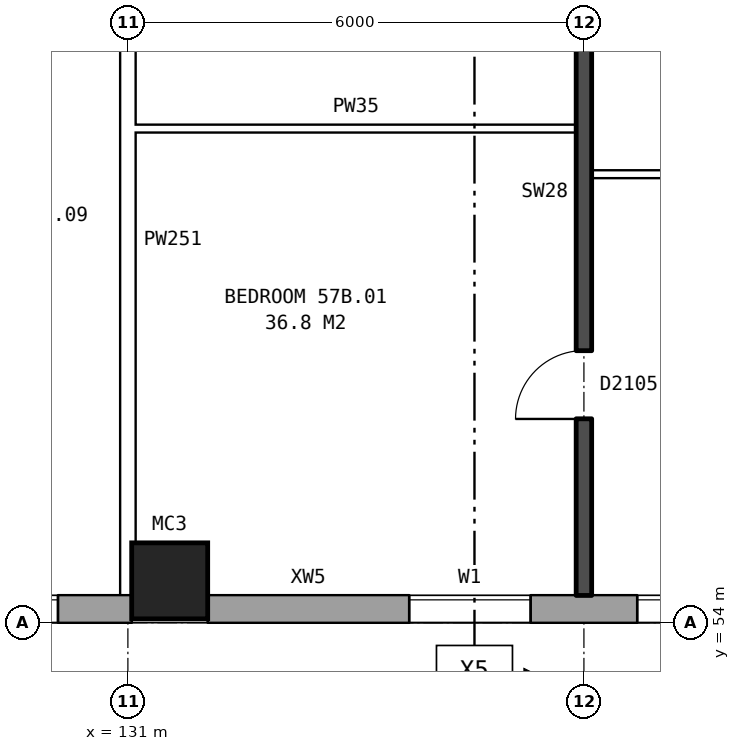
"""IFC4 building model, lengths in metres.
Left out: names, types, materials, properties, quantities, classifications, styles, units other than length and angle.
Written with IfcOpenShell. Run it as: python <this file> out.ifc"""

import sys

from ifc_helpers import new_model, si_unit, direction, frame, frame_2d, origin, origin_2d, place, context, subcontext, project, spatial, rectangle, hollow_rectangle, extrude, element, fill, save


model = new_model("IFC4")
c1 = context("Model", 3, precision=1e-05, world=origin(), true_north=direction((0.0, 1.0)))
c2 = subcontext(c1, "Body", "Model", "MODEL_VIEW")
j1 = project(units=[si_unit("LENGTHUNIT", "METRE"), si_unit("PLANEANGLEUNIT", "RADIAN")], contexts=[c1])
p1 = place(None, origin())
s1 = spatial("IfcSite", under=j1, at=p1, CompositionType="ELEMENT")
p2 = place(p1, origin())
s2 = spatial("IfcBuilding", under=s1, at=p2, CompositionType="ELEMENT")
p3 = place(p2, frame((0.0, 0.0, 202.8)))
s3 = spatial("IfcBuildingStorey", under=s2, at=p3, CompositionType="ELEMENT", Elevation=202.8)
p4 = place(p3, frame((131.55, 54.55, 0.0), z_axis=(0.0, 0.0, 1.0), x_axis=(1.0, 0.0, 0.0)))
e1 = element("IfcColumn", 1, at=p4, inside=s3, PredefinedType="COLUMN", context=c2, shape_type="SweptSolid", body=[
    extrude(hollow_rectangle(XDim=1.0, YDim=1.0, WallThickness=0.055, at=origin_2d()), origin(), (0.0, 0.0, 1.0), 3.1),
])
p5 = place(p3, frame((75.95, 54.18, 0.0), z_axis=(0.0, 0.0, 1.0), x_axis=(1.0, 0.0, 0.0)))
e2 = element("IfcWall", 2, at=p5, inside=s3, PredefinedType="STANDARD", context=c2, shape_type="SweptSolid", body=[
    extrude(rectangle(XDim=55.1, YDim=0.36, at=frame_2d((27.55, 0.0))), origin(), (0.0, 0.0, 1.0), 2.85),
])
p6 = place(p5, frame((0.969, 0.0, 0.8)))
e3 = element("IfcOpeningElement", 3, at=p6, cuts=e2, PredefinedType="OPENING", context=c2, shape_type="SweptSolid", body=[
    extrude(rectangle(XDim=1.6, YDim=1.8, at=frame_2d((0.8, 0.9))), frame((0.0, 0.19, 0.0), z_axis=(0.0, -1.0, 0.0), x_axis=(1.0, 0.0, 0.0)), (0.0, 0.0, 1.0), 0.38),
])
p7 = place(p5, frame((4.406, 0.0, 0.8)))
e4 = element("IfcOpeningElement", 4, at=p7, cuts=e2, PredefinedType="OPENING", context=c2, shape_type="SweptSolid", body=[
    extrude(rectangle(XDim=1.6, YDim=1.8, at=frame_2d((0.8, 0.9))), frame((0.0, 0.19, 0.0), z_axis=(0.0, -1.0, 0.0), x_axis=(1.0, 0.0, 0.0)), (0.0, 0.0, 1.0), 0.38),
])
p8 = place(p5, frame((7.844, 0.0, 0.8)))
e5 = element("IfcOpeningElement", 5, at=p8, cuts=e2, PredefinedType="OPENING", context=c2, shape_type="SweptSolid", body=[
    extrude(rectangle(XDim=1.6, YDim=1.8, at=frame_2d((0.8, 0.9))), frame((0.0, 0.19, 0.0), z_axis=(0.0, -1.0, 0.0), x_axis=(1.0, 0.0, 0.0)), (0.0, 0.0, 1.0), 0.38),
])
p9 = place(p5, frame((11.281, 0.0, 0.8)))
e6 = element("IfcOpeningElement", 6, at=p9, cuts=e2, PredefinedType="OPENING", context=c2, shape_type="SweptSolid", body=[
    extrude(rectangle(XDim=1.6, YDim=1.8, at=frame_2d((0.8, 0.9))), frame((0.0, 0.19, 0.0), z_axis=(0.0, -1.0, 0.0), x_axis=(1.0, 0.0, 0.0)), (0.0, 0.0, 1.0), 0.38),
])
p10 = place(p5, frame((14.719, 0.0, 0.8)))
e7 = element("IfcOpeningElement", 7, at=p10, cuts=e2, PredefinedType="OPENING", context=c2, shape_type="SweptSolid", body=[
    extrude(rectangle(XDim=1.6, YDim=1.8, at=frame_2d((0.8, 0.9))), frame((0.0, 0.19, 0.0), z_axis=(0.0, -1.0, 0.0), x_axis=(1.0, 0.0, 0.0)), (0.0, 0.0, 1.0), 0.38),
])
p11 = place(p5, frame((18.156, 0.0, 0.8)))
e8 = element("IfcOpeningElement", 8, at=p11, cuts=e2, PredefinedType="OPENING", context=c2, shape_type="SweptSolid", body=[
    extrude(rectangle(XDim=1.6, YDim=1.8, at=frame_2d((0.8, 0.9))), frame((0.0, 0.19, 0.0), z_axis=(0.0, -1.0, 0.0), x_axis=(1.0, 0.0, 0.0)), (0.0, 0.0, 1.0), 0.38),
])
p12 = place(p5, frame((21.594, 0.0, 0.8)))
e9 = element("IfcOpeningElement", 9, at=p12, cuts=e2, PredefinedType="OPENING", context=c2, shape_type="SweptSolid", body=[
    extrude(rectangle(XDim=1.6, YDim=1.8, at=frame_2d((0.8, 0.9))), frame((0.0, 0.19, 0.0), z_axis=(0.0, -1.0, 0.0), x_axis=(1.0, 0.0, 0.0)), (0.0, 0.0, 1.0), 0.38),
])
p13 = place(p5, frame((25.031, 0.0, 0.8)))
e10 = element("IfcOpeningElement", 10, at=p13, cuts=e2, PredefinedType="OPENING", context=c2, shape_type="SweptSolid", body=[
    extrude(rectangle(XDim=1.6, YDim=1.8, at=frame_2d((0.8, 0.9))), frame((0.0, 0.19, 0.0), z_axis=(0.0, -1.0, 0.0), x_axis=(1.0, 0.0, 0.0)), (0.0, 0.0, 1.0), 0.38),
])
p14 = place(p5, frame((28.469, 0.0, 0.8)))
e11 = element("IfcOpeningElement", 11, at=p14, cuts=e2, PredefinedType="OPENING", context=c2, shape_type="SweptSolid", body=[
    extrude(rectangle(XDim=1.6, YDim=1.8, at=frame_2d((0.8, 0.9))), frame((0.0, 0.19, 0.0), z_axis=(0.0, -1.0, 0.0), x_axis=(1.0, 0.0, 0.0)), (0.0, 0.0, 1.0), 0.38),
])
p15 = place(p5, frame((31.906, 0.0, 0.8)))
e12 = element("IfcOpeningElement", 12, at=p15, cuts=e2, PredefinedType="OPENING", context=c2, shape_type="SweptSolid", body=[
    extrude(rectangle(XDim=1.6, YDim=1.8, at=frame_2d((0.8, 0.9))), frame((0.0, 0.19, 0.0), z_axis=(0.0, -1.0, 0.0), x_axis=(1.0, 0.0, 0.0)), (0.0, 0.0, 1.0), 0.38),
])
p16 = place(p5, frame((35.344, 0.0, 0.8)))
e13 = element("IfcOpeningElement", 13, at=p16, cuts=e2, PredefinedType="OPENING", context=c2, shape_type="SweptSolid", body=[
    extrude(rectangle(XDim=1.6, YDim=1.8, at=frame_2d((0.8, 0.9))), frame((0.0, 0.19, 0.0), z_axis=(0.0, -1.0, 0.0), x_axis=(1.0, 0.0, 0.0)), (0.0, 0.0, 1.0), 0.38),
])
p17 = place(p5, frame((38.781, 0.0, 0.8)))
e14 = element("IfcOpeningElement", 14, at=p17, cuts=e2, PredefinedType="OPENING", context=c2, shape_type="SweptSolid", body=[
    extrude(rectangle(XDim=1.6, YDim=1.8, at=frame_2d((0.8, 0.9))), frame((0.0, 0.19, 0.0), z_axis=(0.0, -1.0, 0.0), x_axis=(1.0, 0.0, 0.0)), (0.0, 0.0, 1.0), 0.38),
])
p18 = place(p5, frame((42.219, 0.0, 0.8)))
e15 = element("IfcOpeningElement", 15, at=p18, cuts=e2, PredefinedType="OPENING", context=c2, shape_type="SweptSolid", body=[
    extrude(rectangle(XDim=1.6, YDim=1.8, at=frame_2d((0.8, 0.9))), frame((0.0, 0.19, 0.0), z_axis=(0.0, -1.0, 0.0), x_axis=(1.0, 0.0, 0.0)), (0.0, 0.0, 1.0), 0.38),
])
p19 = place(p5, frame((45.656, 0.0, 0.8)))
e16 = element("IfcOpeningElement", 16, at=p19, cuts=e2, PredefinedType="OPENING", context=c2, shape_type="SweptSolid", body=[
    extrude(rectangle(XDim=1.6, YDim=1.8, at=frame_2d((0.8, 0.9))), frame((0.0, 0.19, 0.0), z_axis=(0.0, -1.0, 0.0), x_axis=(1.0, 0.0, 0.0)), (0.0, 0.0, 1.0), 0.38),
])
p20 = place(p5, frame((49.094, 0.0, 0.8)))
e17 = element("IfcOpeningElement", 17, at=p20, cuts=e2, PredefinedType="OPENING", context=c2, shape_type="SweptSolid", body=[
    extrude(rectangle(XDim=1.6, YDim=1.8, at=frame_2d((0.8, 0.9))), frame((0.0, 0.19, 0.0), z_axis=(0.0, -1.0, 0.0), x_axis=(1.0, 0.0, 0.0)), (0.0, 0.0, 1.0), 0.38),
])
p21 = place(p5, frame((52.531, 0.0, 0.8)))
e18 = element("IfcOpeningElement", 18, at=p21, cuts=e2, PredefinedType="OPENING", context=c2, shape_type="SweptSolid", body=[
    extrude(rectangle(XDim=1.6, YDim=1.8, at=frame_2d((0.8, 0.9))), frame((0.0, 0.19, 0.0), z_axis=(0.0, -1.0, 0.0), x_axis=(1.0, 0.0, 0.0)), (0.0, 0.0, 1.0), 0.38),
])
p22 = place(p3, frame((132.05, 54.18, 0.0), z_axis=(0.0, 0.0, 1.0), x_axis=(1.0, 0.0, 0.0)))
e19 = element("IfcWall", 19, at=p22, inside=s3, PredefinedType="STANDARD", context=c2, shape_type="SweptSolid", body=[
    extrude(rectangle(XDim=33.875, YDim=0.36, at=frame_2d((16.938, 0.0))), origin(), (0.0, 0.0, 1.0), 2.85),
])
p23 = place(p22, frame((2.65, 0.0, 0.8)))
e20 = element("IfcOpeningElement", 20, at=p23, cuts=e19, PredefinedType="OPENING", context=c2, shape_type="SweptSolid", body=[
    extrude(rectangle(XDim=1.6, YDim=1.8, at=frame_2d((0.8, 0.9))), frame((0.0, 0.19, 0.0), z_axis=(0.0, -1.0, 0.0), x_axis=(1.0, 0.0, 0.0)), (0.0, 0.0, 1.0), 0.38),
])
p24 = place(p22, frame((5.65, 0.0, 0.8)))
e21 = element("IfcOpeningElement", 21, at=p24, cuts=e19, PredefinedType="OPENING", context=c2, shape_type="SweptSolid", body=[
    extrude(rectangle(XDim=1.6, YDim=1.8, at=frame_2d((0.8, 0.9))), frame((0.0, 0.19, 0.0), z_axis=(0.0, -1.0, 0.0), x_axis=(1.0, 0.0, 0.0)), (0.0, 0.0, 1.0), 0.38),
])
p25 = place(p22, frame((8.65, 0.0, 0.8)))
e22 = element("IfcOpeningElement", 22, at=p25, cuts=e19, PredefinedType="OPENING", context=c2, shape_type="SweptSolid", body=[
    extrude(rectangle(XDim=1.6, YDim=1.8, at=frame_2d((0.8, 0.9))), frame((0.0, 0.19, 0.0), z_axis=(0.0, -1.0, 0.0), x_axis=(1.0, 0.0, 0.0)), (0.0, 0.0, 1.0), 0.38),
])
p26 = place(p22, frame((11.65, 0.0, 0.8)))
e23 = element("IfcOpeningElement", 23, at=p26, cuts=e19, PredefinedType="OPENING", context=c2, shape_type="SweptSolid", body=[
    extrude(rectangle(XDim=1.6, YDim=1.8, at=frame_2d((0.8, 0.9))), frame((0.0, 0.19, 0.0), z_axis=(0.0, -1.0, 0.0), x_axis=(1.0, 0.0, 0.0)), (0.0, 0.0, 1.0), 0.38),
])
p27 = place(p22, frame((14.65, 0.0, 0.8)))
e24 = element("IfcOpeningElement", 24, at=p27, cuts=e19, PredefinedType="OPENING", context=c2, shape_type="SweptSolid", body=[
    extrude(rectangle(XDim=1.6, YDim=1.8, at=frame_2d((0.8, 0.9))), frame((0.0, 0.19, 0.0), z_axis=(0.0, -1.0, 0.0), x_axis=(1.0, 0.0, 0.0)), (0.0, 0.0, 1.0), 0.38),
])
p28 = place(p22, frame((17.65, 0.0, 0.8)))
e25 = element("IfcOpeningElement", 25, at=p28, cuts=e19, PredefinedType="OPENING", context=c2, shape_type="SweptSolid", body=[
    extrude(rectangle(XDim=1.6, YDim=1.8, at=frame_2d((0.8, 0.9))), frame((0.0, 0.19, 0.0), z_axis=(0.0, -1.0, 0.0), x_axis=(1.0, 0.0, 0.0)), (0.0, 0.0, 1.0), 0.38),
])
p29 = place(p22, frame((20.65, 0.0, 0.8)))
e26 = element("IfcOpeningElement", 26, at=p29, cuts=e19, PredefinedType="OPENING", context=c2, shape_type="SweptSolid", body=[
    extrude(rectangle(XDim=1.6, YDim=1.8, at=frame_2d((0.8, 0.9))), frame((0.0, 0.19, 0.0), z_axis=(0.0, -1.0, 0.0), x_axis=(1.0, 0.0, 0.0)), (0.0, 0.0, 1.0), 0.38),
])
p30 = place(p22, frame((23.65, 0.0, 0.8)))
e27 = element("IfcOpeningElement", 27, at=p30, cuts=e19, PredefinedType="OPENING", context=c2, shape_type="SweptSolid", body=[
    extrude(rectangle(XDim=1.6, YDim=1.8, at=frame_2d((0.8, 0.9))), frame((0.0, 0.19, 0.0), z_axis=(0.0, -1.0, 0.0), x_axis=(1.0, 0.0, 0.0)), (0.0, 0.0, 1.0), 0.38),
])
p31 = place(p22, frame((26.65, 0.0, 0.8)))
e28 = element("IfcOpeningElement", 28, at=p31, cuts=e19, PredefinedType="OPENING", context=c2, shape_type="SweptSolid", body=[
    extrude(rectangle(XDim=1.6, YDim=1.8, at=frame_2d((0.8, 0.9))), frame((0.0, 0.19, 0.0), z_axis=(0.0, -1.0, 0.0), x_axis=(1.0, 0.0, 0.0)), (0.0, 0.0, 1.0), 0.38),
])
p32 = place(p22, frame((29.65, 0.0, 0.8)))
e29 = element("IfcOpeningElement", 29, at=p32, cuts=e19, PredefinedType="OPENING", context=c2, shape_type="SweptSolid", body=[
    extrude(rectangle(XDim=1.6, YDim=1.8, at=frame_2d((0.8, 0.9))), frame((0.0, 0.19, 0.0), z_axis=(0.0, -1.0, 0.0), x_axis=(1.0, 0.0, 0.0)), (0.0, 0.0, 1.0), 0.38),
])
p33 = place(p3, frame((137.1, 59.9, 0.0), z_axis=(0.0, 0.0, 1.0), x_axis=(1.0, 0.0, 0.0)))
e30 = element("IfcWall", 30, at=p33, inside=s3, PredefinedType="PARTITIONING", context=c2, shape_type="SweptSolid", body=[
    extrude(rectangle(XDim=5.8, YDim=0.1, at=frame_2d((2.9, 0.0))), origin(), (0.0, 0.0, 1.0), 2.85),
])
p34 = place(p33, frame((1.3, 0.0, 0.0)))
e31 = element("IfcOpeningElement", 31, at=p34, cuts=e30, PredefinedType="OPENING", context=c2, shape_type="SweptSolid", body=[
    extrude(rectangle(XDim=0.9, YDim=2.1, at=frame_2d((0.45, 1.05))), frame((0.0, 0.06, 0.0), z_axis=(0.0, -1.0, 0.0), x_axis=(1.0, 0.0, 0.0)), (0.0, 0.0, 1.0), 0.12),
])
p35 = place(p33, frame((4.2, 0.0, 0.0)))
e32 = element("IfcOpeningElement", 32, at=p35, cuts=e30, PredefinedType="OPENING", context=c2, shape_type="SweptSolid", body=[
    extrude(rectangle(XDim=0.9, YDim=2.1, at=frame_2d((0.45, 1.05))), frame((0.0, 0.06, 0.0), z_axis=(0.0, -1.0, 0.0), x_axis=(1.0, 0.0, 0.0)), (0.0, 0.0, 1.0), 0.12),
])
p36 = place(p3, frame((131.1, 60.5, 0.0), z_axis=(0.0, 0.0, 1.0), x_axis=(1.0, 0.0, 0.0)))
e33 = element("IfcWall", 33, at=p36, inside=s3, PredefinedType="PARTITIONING", context=c2, shape_type="SweptSolid", body=[
    extrude(rectangle(XDim=5.8, YDim=0.1, at=frame_2d((2.9, 0.0))), origin(), (0.0, 0.0, 1.0), 2.85),
])
p37 = place(p3, frame((131.0, 54.36, 0.0), z_axis=(0.0, 0.0, 1.0), x_axis=(0.0, 1.0, 0.0)))
e34 = element("IfcWall", 34, at=p37, inside=s3, PredefinedType="PARTITIONING", context=c2, shape_type="SweptSolid", body=[
    extrude(rectangle(XDim=9.34, YDim=0.2, at=frame_2d((4.67, 0.0))), origin(), (0.0, 0.0, 1.0), 2.85),
])
p38 = place(p3, frame((137.0, 54.36, 0.0), z_axis=(0.0, 0.0, 1.0), x_axis=(0.0, 1.0, 0.0)))
e35 = element("IfcWall", 35, at=p38, inside=s3, PredefinedType="SOLIDWALL", context=c2, shape_type="SweptSolid", body=[
    extrude(rectangle(XDim=9.44, YDim=0.2, at=frame_2d((4.72, 0.0))), origin(), (0.0, 0.0, 1.0), 2.85),
])
p39 = place(p38, frame((2.32, 0.0, 0.0)))
e36 = element("IfcOpeningElement", 36, at=p39, cuts=e35, PredefinedType="OPENING", context=c2, shape_type="SweptSolid", body=[
    extrude(rectangle(XDim=0.9, YDim=2.1, at=frame_2d((0.45, 1.05))), frame((0.0, 0.11, 0.0), z_axis=(0.0, -1.0, 0.0), x_axis=(1.0, 0.0, 0.0)), (0.0, 0.0, 1.0), 0.22),
])
p40 = place(p38, frame((7.39, 0.0, 0.0)))
e37 = element("IfcOpeningElement", 37, at=p40, cuts=e35, PredefinedType="OPENING", context=c2, shape_type="SweptSolid", body=[
    extrude(rectangle(XDim=0.8, YDim=2.1, at=frame_2d((0.4, 1.05))), frame((0.0, 0.11, 0.0), z_axis=(0.0, -1.0, 0.0), x_axis=(1.0, 0.0, 0.0)), (0.0, 0.0, 1.0), 0.22),
])
p41 = place(p21, origin())
e38 = element("IfcWindow", 38, at=p41, inside=s3, PartitioningType="SINGLE_PANEL", PredefinedType="WINDOW", context=c2, shape_type="SweptSolid", body=[
    extrude(rectangle(XDim=1.6, YDim=1.8, at=frame_2d((0.8, 0.9))), frame((0.0, 0.15, 0.0), z_axis=(0.0, -1.0, 0.0), x_axis=(1.0, 0.0, 0.0)), (0.0, 0.0, 1.0), 0.06),
])
fill(e18, e38)
p42 = place(p23, origin())
e39 = element("IfcWindow", 39, at=p42, inside=s3, PartitioningType="SINGLE_PANEL", PredefinedType="WINDOW", context=c2, shape_type="SweptSolid", body=[
    extrude(rectangle(XDim=1.6, YDim=1.8, at=frame_2d((0.8, 0.9))), frame((0.0, 0.15, 0.0), z_axis=(0.0, -1.0, 0.0), x_axis=(1.0, 0.0, 0.0)), (0.0, 0.0, 1.0), 0.06),
])
fill(e20, e39)
p43 = place(p24, origin())
e40 = element("IfcWindow", 40, at=p43, inside=s3, PartitioningType="SINGLE_PANEL", PredefinedType="WINDOW", context=c2, shape_type="SweptSolid", body=[
    extrude(rectangle(XDim=1.6, YDim=1.8, at=frame_2d((0.8, 0.9))), frame((0.0, 0.15, 0.0), z_axis=(0.0, -1.0, 0.0), x_axis=(1.0, 0.0, 0.0)), (0.0, 0.0, 1.0), 0.06),
])
fill(e21, e40)
p44 = place(p39, origin())
e41 = element("IfcDoor", 41, at=p44, inside=s3, OperationType="SINGLE_SWING_LEFT", PredefinedType="DOOR", context=c2, shape_type="SweptSolid", body=[
    extrude(rectangle(XDim=0.9, YDim=2.1, at=frame_2d((0.45, 1.05))), frame((0.0, 0.025, 0.0), z_axis=(0.0, -1.0, 0.0), x_axis=(1.0, 0.0, 0.0)), (0.0, 0.0, 1.0), 0.05),
])
fill(e36, e41)
save(model, sys.argv[1])
